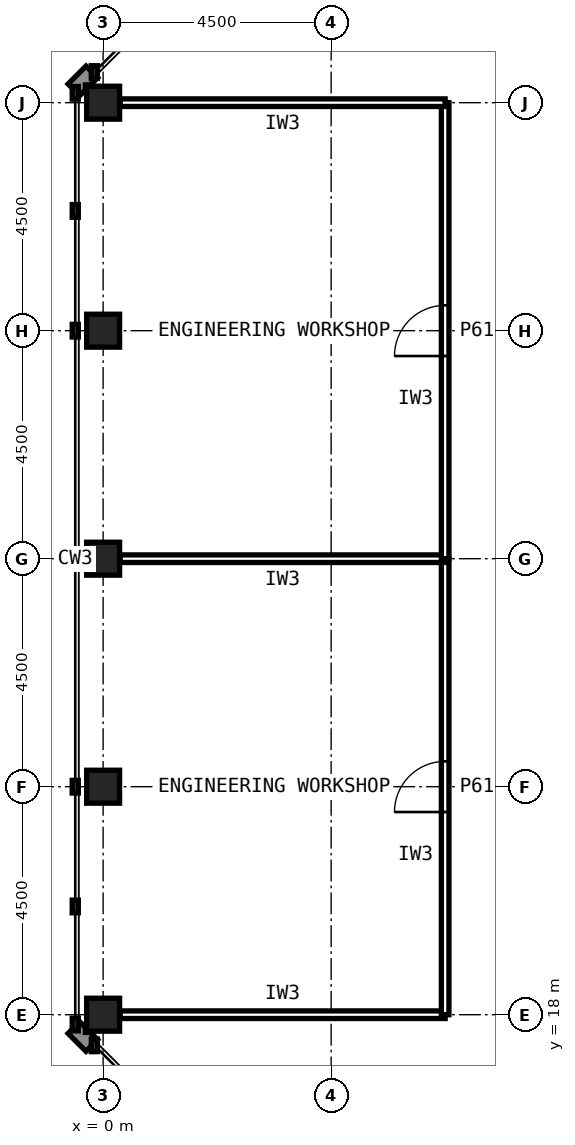
"""IFC4 building model, lengths in metres.
Left out: names, types, materials, properties, quantities, classifications, styles, units other than length and angle.
Written with IfcOpenShell. Run it as: python <this file> out.ifc"""

import sys

from ifc_helpers import new_model, si_unit, direction, frame, frame_2d, origin, origin_2d, place, context, subcontext, project, spatial, rectangle, hollow_rectangle, extrude, element, fill, save


model = new_model("IFC4")
c1 = context("Model", 3, precision=1e-05, world=origin(), true_north=direction((0.0, 1.0)))
c2 = subcontext(c1, "Body", "Model", "MODEL_VIEW")
j1 = project(units=[si_unit("LENGTHUNIT", "METRE"), si_unit("PLANEANGLEUNIT", "RADIAN")], contexts=[c1])
p1 = place(None, origin())
s1 = spatial("IfcSite", under=j1, at=p1, CompositionType="ELEMENT")
p2 = place(p1, origin())
s2 = spatial("IfcBuilding", under=s1, at=p2, CompositionType="ELEMENT")
p3 = place(p2, frame((0.0, 0.0, 254.6)))
s3 = spatial("IfcBuildingStorey", under=s2, at=p3, CompositionType="ELEMENT", Elevation=254.6)
for number, where, z_axis, x_axis in (
    (1, (0.0, 36.0, 0.0), (0.0, 0.0, 1.0), (1.0, 0.0, 0.0)),
    (2, (0.0, 31.5, 0.0), (0.0, 0.0, 1.0), (1.0, 0.0, 0.0)),
    (3, (0.0, 27.0, 0.0), (0.0, 0.0, 1.0), (1.0, 0.0, 0.0)),
    (4, (0.0, 22.5, 0.0), (0.0, 0.0, 1.0), (1.0, 0.0, 0.0)),
    (5, (0.0, 18.0, 0.0), (0.0, 0.0, 1.0), (1.0, 0.0, 0.0)),
):
    element("IfcColumn", number, at=place(p3, frame(where, z_axis=z_axis, x_axis=x_axis)), inside=s3, PredefinedType="COLUMN", context=c2, shape_type="SweptSolid", body=[
        extrude(hollow_rectangle(XDim=0.65, YDim=0.65, WallThickness=0.032, at=origin_2d()), origin(), (0.0, 0.0, 1.0), 4.0),
    ])
p4 = place(p3, frame((0.335, 18.0, 0.0), z_axis=(0.0, 0.0, 1.0), x_axis=(1.0, 0.0, 0.0)))
e6 = element("IfcWall", 6, at=p4, inside=s3, PredefinedType="PARTITIONING", context=c2, shape_type="SweptSolid", body=[
    extrude(rectangle(XDim=6.415, YDim=0.15, at=frame_2d((3.208, 0.0))), origin(), (0.0, 0.0, 1.0), 2.989),
])
p5 = place(p3, frame((6.75, 18.0, 0.0), z_axis=(0.0, 0.0, 1.0), x_axis=(0.0, 1.0, 0.0)))
e7 = element("IfcWall", 7, at=p5, inside=s3, PredefinedType="PARTITIONING", context=c2, shape_type="SweptSolid", body=[
    extrude(rectangle(XDim=9.0, YDim=0.15, at=frame_2d((4.5, 0.0))), origin(), (0.0, 0.0, 1.0), 3.84),
])
p6 = place(p5, frame((4.0, 0.0, 0.0)))
e8 = element("IfcOpeningElement", 8, at=p6, cuts=e7, PredefinedType="OPENING", context=c2, shape_type="SweptSolid", body=[
    extrude(rectangle(XDim=1.0, YDim=2.1, at=frame_2d((0.5, 1.05))), frame((0.0, 0.085, 0.0), z_axis=(0.0, -1.0, 0.0), x_axis=(1.0, 0.0, 0.0)), (0.0, 0.0, 1.0), 0.17),
])
p7 = place(p3, frame((6.75, 27.0, 0.0), z_axis=(0.0, 0.0, 1.0), x_axis=(-1.0, 0.0, 0.0)))
e9 = element("IfcWall", 9, at=p7, inside=s3, PredefinedType="PARTITIONING", context=c2, shape_type="SweptSolid", body=[
    extrude(rectangle(XDim=6.415, YDim=0.15, at=frame_2d((3.208, 0.0))), origin(), (0.0, 0.0, 1.0), 2.989),
])
p8 = place(p3, frame((6.75, 27.0, 0.0), z_axis=(0.0, 0.0, 1.0), x_axis=(0.0, 1.0, 0.0)))
e10 = element("IfcWall", 10, at=p8, inside=s3, PredefinedType="PARTITIONING", context=c2, shape_type="SweptSolid", body=[
    extrude(rectangle(XDim=9.0, YDim=0.15, at=frame_2d((4.5, 0.0))), origin(), (0.0, 0.0, 1.0), 3.84),
])
p9 = place(p8, frame((4.0, 0.0, 0.0)))
e11 = element("IfcOpeningElement", 11, at=p9, cuts=e10, PredefinedType="OPENING", context=c2, shape_type="SweptSolid", body=[
    extrude(rectangle(XDim=1.0, YDim=2.1, at=frame_2d((0.5, 1.05))), frame((0.0, 0.085, 0.0), z_axis=(0.0, -1.0, 0.0), x_axis=(1.0, 0.0, 0.0)), (0.0, 0.0, 1.0), 0.17),
])
p10 = place(p3, frame((6.75, 36.0, 0.0), z_axis=(0.0, 0.0, 1.0), x_axis=(-1.0, 0.0, 0.0)))
e12 = element("IfcWall", 12, at=p10, inside=s3, PredefinedType="PARTITIONING", context=c2, shape_type="SweptSolid", body=[
    extrude(rectangle(XDim=6.415, YDim=0.15, at=frame_2d((3.208, 0.0))), origin(), (0.0, 0.0, 1.0), 2.989),
])
p11 = place(p6, origin())
e13 = element("IfcDoor", 13, at=p11, inside=s3, OperationType="SINGLE_SWING_LEFT", PredefinedType="DOOR", context=c2, shape_type="SweptSolid", body=[
    extrude(rectangle(XDim=1.0, YDim=2.1, at=frame_2d((0.5, 1.05))), frame((0.0, 0.025, 0.0), z_axis=(0.0, -1.0, 0.0), x_axis=(1.0, 0.0, 0.0)), (0.0, 0.0, 1.0), 0.05),
])
fill(e8, e13)
p12 = place(p9, origin())
e14 = element("IfcDoor", 14, at=p12, inside=s3, OperationType="SINGLE_SWING_LEFT", PredefinedType="DOOR", context=c2, shape_type="SweptSolid", body=[
    extrude(rectangle(XDim=1.0, YDim=2.1, at=frame_2d((0.5, 1.05))), frame((0.0, 0.025, 0.0), z_axis=(0.0, -1.0, 0.0), x_axis=(1.0, 0.0, 0.0)), (0.0, 0.0, 1.0), 0.05),
])
fill(e11, e14)
save(model, sys.argv[1])
